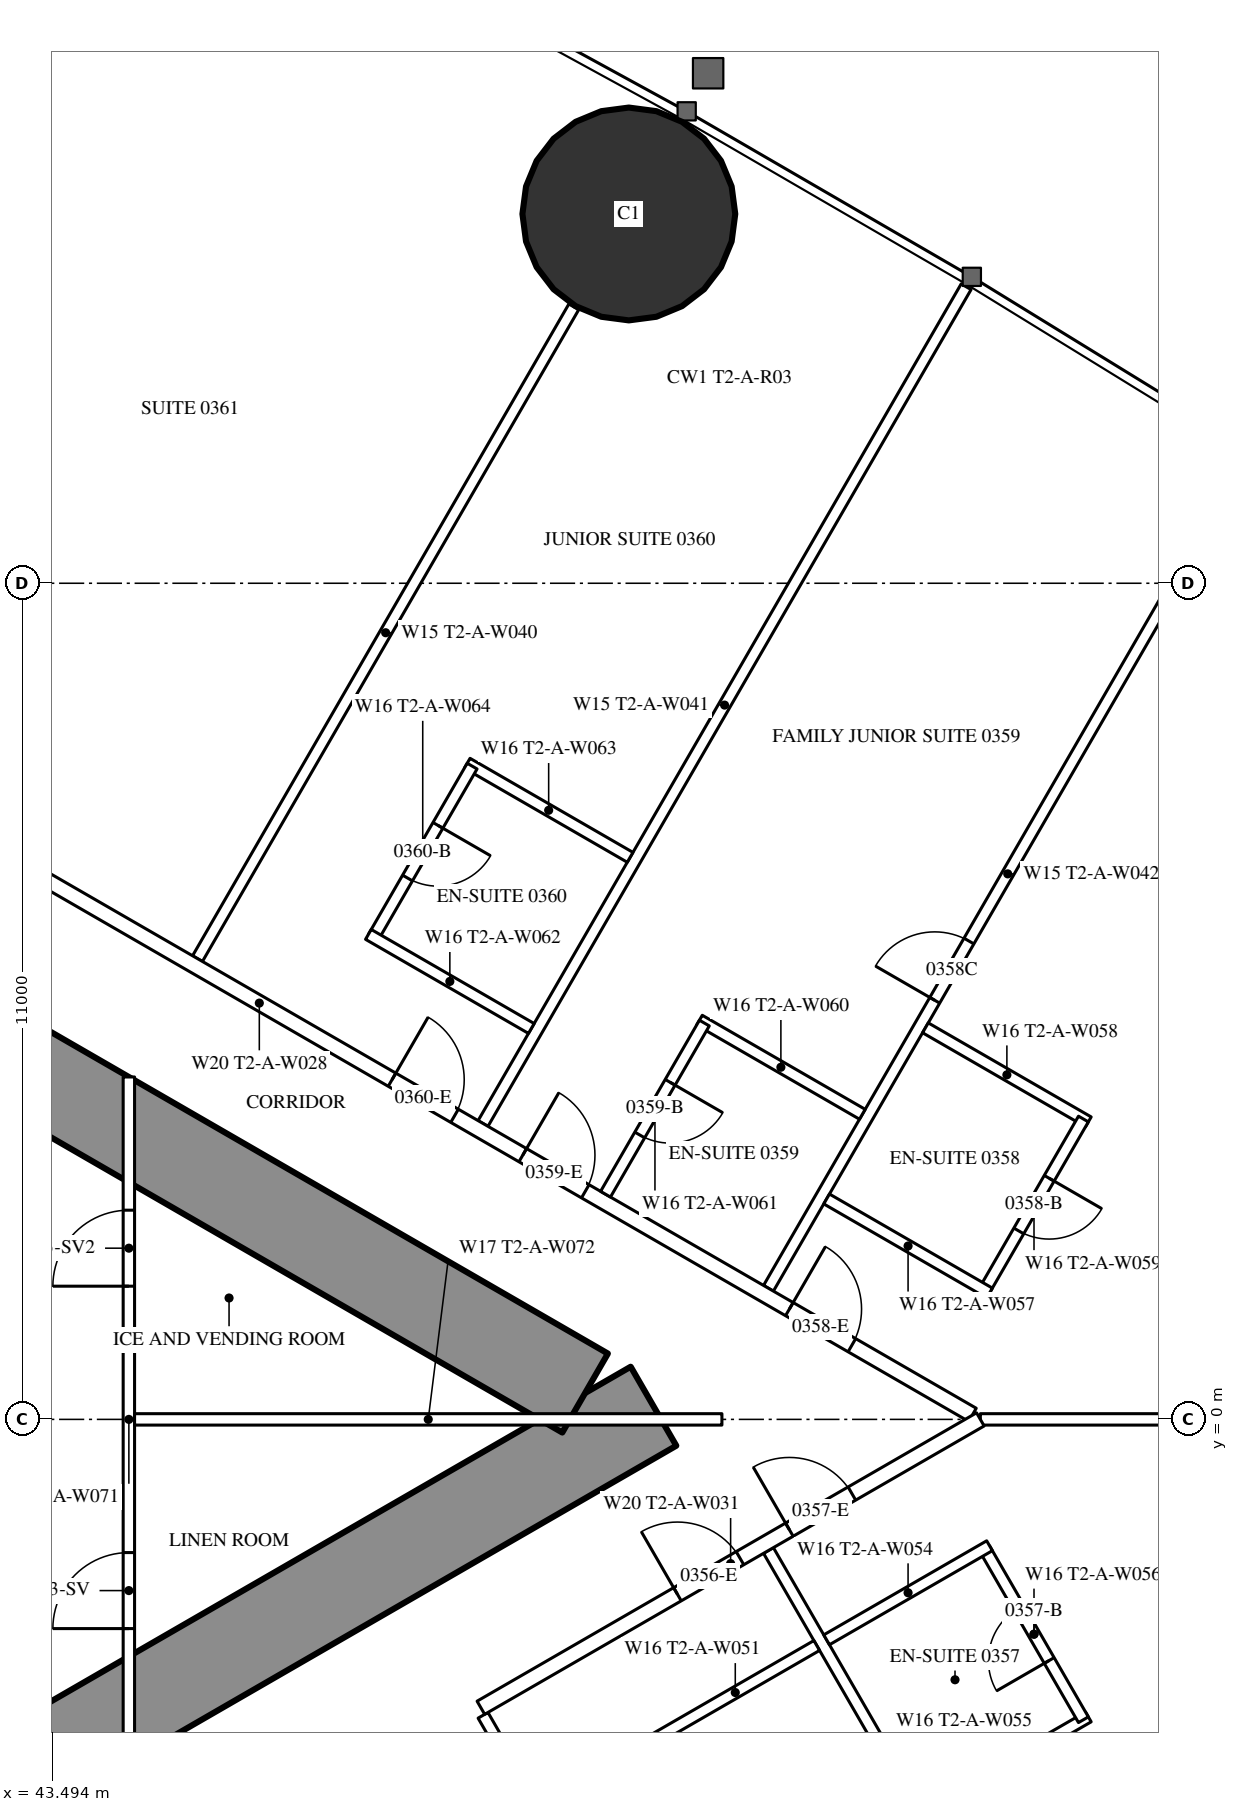
"""IFC4 building model, lengths in metres.
Left out: names, types, materials, properties, quantities, classifications, styles, units other than length and angle.
Written with IfcOpenShell. Run it as: python <this file> out.ifc"""

import sys

from ifc_helpers import new_model, si_unit, direction, frame, frame_2d, origin, origin_2d, place, context, subcontext, project, spatial, rectangle, hollow_circle, extrude, element, fill, save


model = new_model("IFC4")
c1 = context("Model", 3, precision=1e-05, world=origin(), true_north=direction((0.0, 1.0)))
c2 = subcontext(c1, "Body", "Model", "MODEL_VIEW")
j1 = project(units=[si_unit("LENGTHUNIT", "METRE"), si_unit("PLANEANGLEUNIT", "RADIAN")], contexts=[c1])
p1 = place(None, origin())
s1 = spatial("IfcSite", under=j1, at=p1, CompositionType="ELEMENT")
p2 = place(p1, origin())
s2 = spatial("IfcBuilding", under=s1, at=p2, CompositionType="ELEMENT")
p3 = place(p2, frame((0.0, 0.0, 18.0)))
s3 = spatial("IfcBuildingStorey", under=s2, at=p3, CompositionType="ELEMENT", Elevation=18.0)
p4 = place(p3, frame((51.078, 15.858, 0.0), z_axis=(0.0, 0.0, 1.0), x_axis=(1.0, 0.0, 0.0)))
e1 = element("IfcColumn", 1, at=p4, inside=s3, PredefinedType="COLUMN", context=c2, shape_type="SweptSolid", body=[
    extrude(hollow_circle(Radius=1.4, WallThickness=0.12, at=origin_2d()), origin(), (0.0, 0.0, 1.0), 3.5),
])
p5 = place(p3, frame((27.2, -13.8, 0.0), z_axis=(0.0, 0.0, 1.0), x_axis=(0.866027159892, 0.499996958321, 0.0)))
e2 = element("IfcWall", 2, at=p5, inside=s3, PredefinedType="SHEAR", context=c2, shape_type="SweptSolid", body=[
    extrude(rectangle(XDim=27.947, YDim=1.2, at=frame_2d((13.973, 0.0))), origin(), (0.0, 0.0, 1.0), 3.5),
])
p6 = place(p5, frame((4.6, 0.0, 0.0)))
e3 = element("IfcOpeningElement", 3, at=p6, cuts=e2, PredefinedType="OPENING", context=c2, shape_type="SweptSolid", body=[
    extrude(rectangle(XDim=1.0, YDim=2.2, at=frame_2d((0.5, 1.1))), frame((0.0, 0.61, 0.0), z_axis=(0.0, -1.0, 0.0), x_axis=(1.0, 0.0, 0.0)), (0.0, 0.0, 1.0), 1.22),
])
p7 = place(p5, frame((13.395, 0.0, 0.0)))
e4 = element("IfcOpeningElement", 4, at=p7, cuts=e2, PredefinedType="OPENING", context=c2, shape_type="SweptSolid", body=[
    extrude(rectangle(XDim=1.8, YDim=2.2, at=frame_2d((0.9, 1.1))), frame((0.0, 0.61, 0.0), z_axis=(0.0, -1.0, 0.0), x_axis=(1.0, 0.0, 0.0)), (0.0, 0.0, 1.0), 1.22),
])
p8 = place(p3, frame((27.2, 13.8, 0.0), z_axis=(0.0, 0.0, 1.0), x_axis=(0.866024515034, -0.500001539357, 0.0)))
e5 = element("IfcWall", 5, at=p8, inside=s3, PredefinedType="SHEAR", context=c2, shape_type="SweptSolid", body=[
    extrude(rectangle(XDim=26.907, YDim=1.2, at=frame_2d((13.454, 0.0))), origin(), (0.0, 0.0, 1.0), 3.5),
])
p9 = place(p8, frame((4.6, 0.0, 0.0)))
e6 = element("IfcOpeningElement", 6, at=p9, cuts=e5, PredefinedType="OPENING", context=c2, shape_type="SweptSolid", body=[
    extrude(rectangle(XDim=1.0, YDim=2.2, at=frame_2d((0.5, 1.1))), frame((0.0, 0.61, 0.0), z_axis=(0.0, -1.0, 0.0), x_axis=(1.0, 0.0, 0.0)), (0.0, 0.0, 1.0), 1.22),
])
p10 = place(p8, frame((13.395, 0.0, 0.0)))
e7 = element("IfcOpeningElement", 7, at=p10, cuts=e5, PredefinedType="OPENING", context=c2, shape_type="SweptSolid", body=[
    extrude(rectangle(XDim=1.8, YDim=2.2, at=frame_2d((0.9, 1.1))), frame((0.0, 0.61, 0.0), z_axis=(0.0, -1.0, 0.0), x_axis=(1.0, 0.0, 0.0)), (0.0, 0.0, 1.0), 1.22),
])
p11 = place(p3, frame((49.159, -3.893, 0.0), z_axis=(0.0, 0.0, 1.0), x_axis=(0.499998773722, -0.866026111775, 0.0)))
e8 = element("IfcWall", 8, at=p11, inside=s3, PredefinedType="PARTITIONING", context=c2, shape_type="SweptSolid", body=[
    extrude(rectangle(XDim=9.892, YDim=0.15, at=frame_2d((4.946, 0.0))), origin(), (0.0, 0.0, 1.0), 2.25),
])
p12 = place(p3, frame((52.915, -1.725, 0.0), z_axis=(0.0, 0.0, 1.0), x_axis=(0.499997163113, -0.866027041656, 0.0)))
e9 = element("IfcWall", 9, at=p12, inside=s3, PredefinedType="PARTITIONING", context=c2, shape_type="SweptSolid", body=[
    extrude(rectangle(XDim=12.591, YDim=0.15, at=frame_2d((6.295, 0.0))), origin(), (0.0, 0.0, 1.0), 3.25),
])
p13 = place(p3, frame((45.403, 6.062, 0.0), z_axis=(0.0, 0.0, 1.0), x_axis=(0.500013434677, 0.866017647131, 0.0)))
e10 = element("IfcWall", 10, at=p13, inside=s3, PredefinedType="PARTITIONING", context=c2, shape_type="SweptSolid", body=[
    extrude(rectangle(XDim=9.902, YDim=0.15, at=frame_2d((4.951, 0.0))), origin(), (0.0, 0.0, 1.0), 2.25),
])
p14 = place(p3, frame((49.159, 3.893, 0.0), z_axis=(0.0, 0.0, 1.0), x_axis=(0.499995664361, 0.866027906952, 0.0)))
e11 = element("IfcWall", 11, at=p14, inside=s3, PredefinedType="PARTITIONING", context=c2, shape_type="SweptSolid", body=[
    extrude(rectangle(XDim=12.711, YDim=0.15, at=frame_2d((6.356, 0.0))), origin(), (0.0, 0.0, 1.0), 3.25),
])
p15 = place(p3, frame((52.915, 1.725, 0.0), z_axis=(0.0, 0.0, 1.0), x_axis=(0.499997163113, 0.866027041656, 0.0)))
e12 = element("IfcWall", 12, at=p15, inside=s3, PredefinedType="PARTITIONING", context=c2, shape_type="SweptSolid", body=[
    extrude(rectangle(XDim=12.591, YDim=0.15, at=frame_2d((6.295, 0.0))), origin(), (0.0, 0.0, 1.0), 3.25),
])
p16 = place(p15, frame((4.375, 0.0, 0.0)))
e13 = element("IfcOpeningElement", 13, at=p16, cuts=e12, PredefinedType="OPENING", context=c2, shape_type="SweptSolid", body=[
    extrude(rectangle(XDim=0.9, YDim=2.2, at=frame_2d((0.45, 1.1))), frame((0.0, 0.085, 0.0), z_axis=(0.0, -1.0, 0.0), x_axis=(1.0, 0.0, 0.0)), (0.0, 0.0, 1.0), 0.17),
])
p17 = place(p3, frame((55.702, 0.0, 0.0), z_axis=(0.0, 0.0, 1.0), x_axis=(1.0, 0.0, 0.0)))
e14 = element("IfcWall", 14, at=p17, inside=s3, PredefinedType="PARTITIONING", context=c2, shape_type="SweptSolid", body=[
    extrude(rectangle(XDim=16.117, YDim=0.15, at=frame_2d((8.059, 0.0))), origin(), (0.0, 0.0, 1.0), 2.25),
])
p18 = place(p3, frame((36.834, 10.894, 0.0), z_axis=(0.0, 0.0, 1.0), x_axis=(0.866028157229, -0.499995230863, 0.0)))
e15 = element("IfcWall", 15, at=p18, inside=s3, PredefinedType="PARTITIONING", context=c2, shape_type="SweptSolid", body=[
    extrude(rectangle(XDim=21.667, YDim=0.2, at=frame_2d((10.833, 0.0))), origin(), (0.0, 0.0, 1.0), 3.25),
])
p19 = place(p18, frame((18.885, 0.0, 0.0)))
e16 = element("IfcOpeningElement", 16, at=p19, cuts=e15, PredefinedType="OPENING", context=c2, shape_type="SweptSolid", body=[
    extrude(rectangle(XDim=0.95, YDim=2.2, at=frame_2d((0.475, 1.1))), frame((0.0, 0.11, 0.0), z_axis=(0.0, -1.0, 0.0), x_axis=(1.0, 0.0, 0.0)), (0.0, 0.0, 1.0), 0.22),
])
p20 = place(p18, frame((14.835, 0.0, 0.0)))
e17 = element("IfcOpeningElement", 17, at=p20, cuts=e15, PredefinedType="OPENING", context=c2, shape_type="SweptSolid", body=[
    extrude(rectangle(XDim=0.95, YDim=2.2, at=frame_2d((0.475, 1.1))), frame((0.0, 0.11, 0.0), z_axis=(0.0, -1.0, 0.0), x_axis=(1.0, 0.0, 0.0)), (0.0, 0.0, 1.0), 0.22),
])
p21 = place(p18, frame((12.85, 0.0, 0.0)))
e18 = element("IfcOpeningElement", 18, at=p21, cuts=e15, PredefinedType="OPENING", context=c2, shape_type="SweptSolid", body=[
    extrude(rectangle(XDim=0.95, YDim=2.2, at=frame_2d((0.475, 1.1))), frame((0.0, 0.11, 0.0), z_axis=(0.0, -1.0, 0.0), x_axis=(1.0, 0.0, 0.0)), (0.0, 0.0, 1.0), 0.22),
])
p22 = place(p18, frame((1.542, 0.0, 0.0)))
e19 = element("IfcOpeningElement", 19, at=p22, cuts=e15, PredefinedType="OPENING", context=c2, shape_type="SweptSolid", body=[
    extrude(rectangle(XDim=0.95, YDim=2.2, at=frame_2d((0.475, 1.1))), frame((0.0, 0.11, 0.0), z_axis=(0.0, -1.0, 0.0), x_axis=(1.0, 0.0, 0.0)), (0.0, 0.0, 1.0), 0.22),
])
p23 = place(p3, frame((49.131, -3.794, 0.0), z_axis=(0.0, 0.0, 1.0), x_axis=(0.866030732979, 0.499990769451, 0.0)))
e20 = element("IfcWall", 20, at=p23, inside=s3, PredefinedType="PARTITIONING", context=c2, shape_type="SweptSolid", body=[
    extrude(rectangle(XDim=7.588, YDim=0.2, at=frame_2d((3.794, 0.0))), origin(), (0.0, 0.0, 1.0), 3.25),
])
p24 = place(p23, frame((2.986, 0.0, 0.0)))
e21 = element("IfcOpeningElement", 21, at=p24, cuts=e20, PredefinedType="OPENING", context=c2, shape_type="SweptSolid", body=[
    extrude(rectangle(XDim=0.95, YDim=2.2, at=frame_2d((0.475, 1.1))), frame((0.0, 0.11, 0.0), z_axis=(0.0, -1.0, 0.0), x_axis=(1.0, 0.0, 0.0)), (0.0, 0.0, 1.0), 0.22),
])
p25 = place(p23, frame((4.686, 0.0, 0.0)))
e22 = element("IfcOpeningElement", 22, at=p25, cuts=e20, PredefinedType="OPENING", context=c2, shape_type="SweptSolid", body=[
    extrude(rectangle(XDim=0.95, YDim=2.2, at=frame_2d((0.475, 1.1))), frame((0.0, 0.11, 0.0), z_axis=(0.0, -1.0, 0.0), x_axis=(1.0, 0.0, 0.0)), (0.0, 0.0, 1.0), 0.22),
])
p26 = place(p3, frame((51.406, -4.212, 0.0), z_axis=(0.0, 0.0, 1.0), x_axis=(0.866031185235, 0.4999899861, 0.0)))
e23 = element("IfcWall", 23, at=p26, inside=s3, PredefinedType="PARTITIONING", context=c2, shape_type="SweptSolid", body=[
    extrude(rectangle(XDim=2.475, YDim=0.15, at=frame_2d((1.238, 0.0))), origin(), (0.0, 0.0, 1.0), 3.25),
])
p27 = place(p3, frame((54.98, -5.151, 0.0), z_axis=(0.0, 0.0, 1.0), x_axis=(0.86604923931, 0.499958713387, 0.0)))
e24 = element("IfcWall", 24, at=p27, inside=s3, PredefinedType="PARTITIONING", context=c2, shape_type="SweptSolid", body=[
    extrude(rectangle(XDim=2.475, YDim=0.15, at=frame_2d((1.237, 0.0))), origin(), (0.0, 0.0, 1.0), 3.25),
])
p28 = place(p3, frame((55.758, -1.7, 0.0), z_axis=(0.0, 0.0, 1.0), x_axis=(0.500006934395, -0.866021400173, 0.0)))
e25 = element("IfcWall", 25, at=p28, inside=s3, PredefinedType="PARTITIONING", context=c2, shape_type="SweptSolid", body=[
    extrude(rectangle(XDim=2.6, YDim=0.15, at=frame_2d((1.3, 0.0))), origin(), (0.0, 0.0, 1.0), 3.25),
])
p29 = place(p28, frame((0.9, 0.0, 0.0)))
e26 = element("IfcOpeningElement", 26, at=p29, cuts=e25, PredefinedType="OPENING", context=c2, shape_type="SweptSolid", body=[
    extrude(rectangle(XDim=0.8, YDim=2.2, at=frame_2d((0.4, 1.1))), frame((0.0, 0.085, 0.0), z_axis=(0.0, -1.0, 0.0), x_axis=(1.0, 0.0, 0.0)), (0.0, 0.0, 1.0), 0.17),
])
for number, where, z_axis, x_axis in (
    (27, (53.68, -2.9, 0.0), (0.0, 0.0, 1.0), (0.866, 0.5, 0.0)),
    (28, (54.98, 5.151, 0.0), (0.0, 0.0, 1.0), (0.866, -0.5, 0.0)),
):
    element("IfcWall", number, at=place(p3, frame(where, z_axis=z_axis, x_axis=x_axis)), inside=s3, PredefinedType="PARTITIONING", context=c2, shape_type="SweptSolid", body=[
        extrude(rectangle(XDim=2.475, YDim=0.15, at=frame_2d((1.237, 0.0))), origin(), (0.0, 0.0, 1.0), 3.25),
    ])
p30 = place(p3, frame((55.758, 1.7, 0.0), z_axis=(0.0, 0.0, 1.0), x_axis=(0.500006934395, 0.866021400173, 0.0)))
e29 = element("IfcWall", 29, at=p30, inside=s3, PredefinedType="PARTITIONING", context=c2, shape_type="SweptSolid", body=[
    extrude(rectangle(XDim=2.6, YDim=0.15, at=frame_2d((1.3, 0.0))), origin(), (0.0, 0.0, 1.0), 3.25),
])
p31 = place(p30, frame((0.9, 0.0, 0.0)))
e30 = element("IfcOpeningElement", 30, at=p31, cuts=e29, PredefinedType="OPENING", context=c2, shape_type="SweptSolid", body=[
    extrude(rectangle(XDim=0.8, YDim=2.2, at=frame_2d((0.4, 1.1))), frame((0.0, 0.085, 0.0), z_axis=(0.0, -1.0, 0.0), x_axis=(1.0, 0.0, 0.0)), (0.0, 0.0, 1.0), 0.17),
])
for number, where, z_axis, x_axis in (
    (31, (53.68, 2.9, 0.0), (0.0, 0.0, 1.0), (0.866, -0.5, 0.0)),
    (32, (52.006, 5.251, 0.0), (0.0, 0.0, 1.0), (0.866, -0.5, 0.0)),
):
    element("IfcWall", number, at=place(p3, frame(where, z_axis=z_axis, x_axis=x_axis)), inside=s3, PredefinedType="PARTITIONING", context=c2, shape_type="SweptSolid", body=[
        extrude(rectangle(XDim=2.475, YDim=0.15, at=frame_2d((1.237, 0.0))), origin(), (0.0, 0.0, 1.0), 3.25),
    ])
p32 = place(p3, frame((50.771, 2.962, 0.0), z_axis=(0.0, 0.0, 1.0), x_axis=(0.500006934395, 0.866021400173, 0.0)))
e33 = element("IfcWall", 33, at=p32, inside=s3, PredefinedType="PARTITIONING", context=c2, shape_type="SweptSolid", body=[
    extrude(rectangle(XDim=2.6, YDim=0.15, at=frame_2d((1.3, 0.0))), origin(), (0.0, 0.0, 1.0), 3.25),
])
p33 = place(p32, frame((0.9, 0.0, 0.0)))
e34 = element("IfcOpeningElement", 34, at=p33, cuts=e33, PredefinedType="OPENING", context=c2, shape_type="SweptSolid", body=[
    extrude(rectangle(XDim=0.8, YDim=2.2, at=frame_2d((0.4, 1.1))), frame((0.0, 0.085, 0.0), z_axis=(0.0, -1.0, 0.0), x_axis=(1.0, 0.0, 0.0)), (0.0, 0.0, 1.0), 0.17),
])
p34 = place(p3, frame((48.951, 8.632, 0.0), z_axis=(0.0, 0.0, 1.0), x_axis=(0.866006523861, -0.500032699561, 0.0)))
e35 = element("IfcWall", 35, at=p34, inside=s3, PredefinedType="PARTITIONING", context=c2, shape_type="SweptSolid", body=[
    extrude(rectangle(XDim=2.475, YDim=0.15, at=frame_2d((1.237, 0.0))), origin(), (0.0, 0.0, 1.0), 3.25),
])
p35 = place(p3, frame((47.716, 6.343, 0.0), z_axis=(0.0, 0.0, 1.0), x_axis=(0.500006934395, 0.866021400173, 0.0)))
e36 = element("IfcWall", 36, at=p35, inside=s3, PredefinedType="PARTITIONING", context=c2, shape_type="SweptSolid", body=[
    extrude(rectangle(XDim=2.6, YDim=0.15, at=frame_2d((1.3, 0.0))), origin(), (0.0, 0.0, 1.0), 3.25),
])
p36 = place(p35, frame((0.9, 0.0, 0.0)))
e37 = element("IfcOpeningElement", 37, at=p36, cuts=e36, PredefinedType="OPENING", context=c2, shape_type="SweptSolid", body=[
    extrude(rectangle(XDim=0.8, YDim=2.2, at=frame_2d((0.4, 1.1))), frame((0.0, 0.085, 0.0), z_axis=(0.0, -1.0, 0.0), x_axis=(1.0, 0.0, 0.0)), (0.0, 0.0, 1.0), 0.17),
])
p37 = place(p3, frame((47.651, 6.38, 0.0), z_axis=(0.0, 0.0, 1.0), x_axis=(0.866031185235, -0.4999899861, 0.0)))
e38 = element("IfcWall", 38, at=p37, inside=s3, PredefinedType="PARTITIONING", context=c2, shape_type="SweptSolid", body=[
    extrude(rectangle(XDim=2.475, YDim=0.15, at=frame_2d((1.238, 0.0))), origin(), (0.0, 0.0, 1.0), 3.25),
])
p38 = place(p3, frame((44.5, -4.505, 0.0), z_axis=(0.0, 0.0, 1.0), x_axis=(0.0, 1.0, 0.0)))
e39 = element("IfcWall", 39, at=p38, inside=s3, PredefinedType="PARTITIONING", context=c2, shape_type="SweptSolid", body=[
    extrude(rectangle(XDim=9.009, YDim=0.15, at=frame_2d((4.505, 0.0))), origin(), (0.0, 0.0, 1.0), 2.35),
])
p39 = place(p38, frame((1.752, 0.0, 0.0)))
e40 = element("IfcOpeningElement", 40, at=p39, cuts=e39, PredefinedType="OPENING", context=c2, shape_type="SweptSolid", body=[
    extrude(rectangle(XDim=1.0, YDim=2.2, at=frame_2d((0.5, 1.1))), frame((0.0, 0.085, 0.0), z_axis=(0.0, -1.0, 0.0), x_axis=(1.0, 0.0, 0.0)), (0.0, 0.0, 1.0), 0.17),
])
p40 = place(p38, frame((6.257, 0.0, 0.0)))
e41 = element("IfcOpeningElement", 41, at=p40, cuts=e39, PredefinedType="OPENING", context=c2, shape_type="SweptSolid", body=[
    extrude(rectangle(XDim=1.0, YDim=2.2, at=frame_2d((0.5, 1.1))), frame((0.0, 0.085, 0.0), z_axis=(0.0, -1.0, 0.0), x_axis=(1.0, 0.0, 0.0)), (0.0, 0.0, 1.0), 0.17),
])
p41 = place(p3, frame((44.575, 0.0, 0.0), z_axis=(0.0, 0.0, 1.0), x_axis=(1.0, 0.0, 0.0)))
e42 = element("IfcWall", 42, at=p41, inside=s3, PredefinedType="PARTITIONING", context=c2, shape_type="SweptSolid", body=[
    extrude(rectangle(XDim=7.727, YDim=0.15, at=frame_2d((3.864, 0.0))), origin(), (0.0, 0.0, 1.0), 2.25),
])
p42 = place(p24, origin())
e43 = element("IfcDoor", 43, at=p42, inside=s3, OperationType="SINGLE_SWING_LEFT", PredefinedType="DOOR", context=c2, shape_type="SweptSolid", body=[
    extrude(rectangle(XDim=0.95, YDim=2.2, at=frame_2d((0.475, 1.1))), frame((0.0, 0.025, 0.0), z_axis=(0.0, -1.0, 0.0), x_axis=(1.0, 0.0, 0.0)), (0.0, 0.0, 1.0), 0.05),
])
fill(e21, e43)
p43 = place(p29, origin())
e44 = element("IfcDoor", 44, at=p43, inside=s3, OperationType="SINGLE_SWING_RIGHT", PredefinedType="DOOR", context=c2, shape_type="SweptSolid", body=[
    extrude(rectangle(XDim=0.8, YDim=2.2, at=frame_2d((0.4, 1.1))), frame((0.0, 0.025, 0.0), z_axis=(0.0, -1.0, 0.0), x_axis=(1.0, 0.0, 0.0)), (0.0, 0.0, 1.0), 0.05),
])
fill(e26, e44)
p44 = place(p25, origin())
e45 = element("IfcDoor", 45, at=p44, inside=s3, OperationType="SINGLE_SWING_LEFT", PredefinedType="DOOR", context=c2, shape_type="SweptSolid", body=[
    extrude(rectangle(XDim=0.95, YDim=2.2, at=frame_2d((0.475, 1.1))), frame((0.0, 0.025, 0.0), z_axis=(0.0, -1.0, 0.0), x_axis=(1.0, 0.0, 0.0)), (0.0, 0.0, 1.0), 0.05),
])
fill(e22, e45)
p45 = place(p31, origin())
e46 = element("IfcDoor", 46, at=p45, inside=s3, OperationType="SINGLE_SWING_RIGHT", PredefinedType="DOOR", context=c2, shape_type="SweptSolid", body=[
    extrude(rectangle(XDim=0.8, YDim=2.2, at=frame_2d((0.4, 1.1))), frame((0.0, 0.025, 0.0), z_axis=(0.0, -1.0, 0.0), x_axis=(1.0, 0.0, 0.0)), (0.0, 0.0, 1.0), 0.05),
])
fill(e30, e46)
p46 = place(p19, origin())
e47 = element("IfcDoor", 47, at=p46, inside=s3, OperationType="SINGLE_SWING_LEFT", PredefinedType="DOOR", context=c2, shape_type="SweptSolid", body=[
    extrude(rectangle(XDim=0.95, YDim=2.2, at=frame_2d((0.475, 1.1))), frame((0.0, 0.025, 0.0), z_axis=(0.0, -1.0, 0.0), x_axis=(1.0, 0.0, 0.0)), (0.0, 0.0, 1.0), 0.05),
])
fill(e16, e47)
p47 = place(p33, origin())
e48 = element("IfcDoor", 48, at=p47, inside=s3, OperationType="SINGLE_SWING_RIGHT", PredefinedType="DOOR", context=c2, shape_type="SweptSolid", body=[
    extrude(rectangle(XDim=0.8, YDim=2.2, at=frame_2d((0.4, 1.1))), frame((0.0, 0.025, 0.0), z_axis=(0.0, -1.0, 0.0), x_axis=(1.0, 0.0, 0.0)), (0.0, 0.0, 1.0), 0.05),
])
fill(e34, e48)
p48 = place(p20, origin())
e49 = element("IfcDoor", 49, at=p48, inside=s3, OperationType="SINGLE_SWING_LEFT", PredefinedType="DOOR", context=c2, shape_type="SweptSolid", body=[
    extrude(rectangle(XDim=0.95, YDim=2.2, at=frame_2d((0.475, 1.1))), frame((0.0, 0.025, 0.0), z_axis=(0.0, -1.0, 0.0), x_axis=(1.0, 0.0, 0.0)), (0.0, 0.0, 1.0), 0.05),
])
fill(e17, e49)
p49 = place(p36, origin())
e50 = element("IfcDoor", 50, at=p49, inside=s3, OperationType="SINGLE_SWING_RIGHT", PredefinedType="DOOR", context=c2, shape_type="SweptSolid", body=[
    extrude(rectangle(XDim=0.8, YDim=2.2, at=frame_2d((0.4, 1.1))), frame((0.0, 0.025, 0.0), z_axis=(0.0, -1.0, 0.0), x_axis=(1.0, 0.0, 0.0)), (0.0, 0.0, 1.0), 0.05),
])
fill(e37, e50)
p50 = place(p21, origin())
e51 = element("IfcDoor", 51, at=p50, inside=s3, OperationType="SINGLE_SWING_LEFT", PredefinedType="DOOR", context=c2, shape_type="SweptSolid", body=[
    extrude(rectangle(XDim=0.95, YDim=2.2, at=frame_2d((0.475, 1.1))), frame((0.0, 0.025, 0.0), z_axis=(0.0, -1.0, 0.0), x_axis=(1.0, 0.0, 0.0)), (0.0, 0.0, 1.0), 0.05),
])
fill(e18, e51)
p51 = place(p16, origin())
e52 = element("IfcDoor", 52, at=p51, inside=s3, OperationType="SINGLE_SWING_LEFT", PredefinedType="DOOR", context=c2, shape_type="SweptSolid", body=[
    extrude(rectangle(XDim=0.9, YDim=2.2, at=frame_2d((0.45, 1.1))), frame((0.0, 0.025, 0.0), z_axis=(0.0, -1.0, 0.0), x_axis=(1.0, 0.0, 0.0)), (0.0, 0.0, 1.0), 0.05),
])
fill(e13, e52)
p52 = place(p39, origin())
e53 = element("IfcDoor", 53, at=p52, inside=s3, OperationType="SINGLE_SWING_LEFT", PredefinedType="DOOR", context=c2, shape_type="SweptSolid", body=[
    extrude(rectangle(XDim=1.0, YDim=2.2, at=frame_2d((0.5, 1.1))), frame((0.0, 0.025, 0.0), z_axis=(0.0, -1.0, 0.0), x_axis=(1.0, 0.0, 0.0)), (0.0, 0.0, 1.0), 0.05),
])
fill(e40, e53)
p53 = place(p40, origin())
e54 = element("IfcDoor", 54, at=p53, inside=s3, OperationType="SINGLE_SWING_LEFT", PredefinedType="DOOR", context=c2, shape_type="SweptSolid", body=[
    extrude(rectangle(XDim=1.0, YDim=2.2, at=frame_2d((0.5, 1.1))), frame((0.0, 0.025, 0.0), z_axis=(0.0, -1.0, 0.0), x_axis=(1.0, 0.0, 0.0)), (0.0, 0.0, 1.0), 0.05),
])
fill(e41, e54)
save(model, sys.argv[1])
